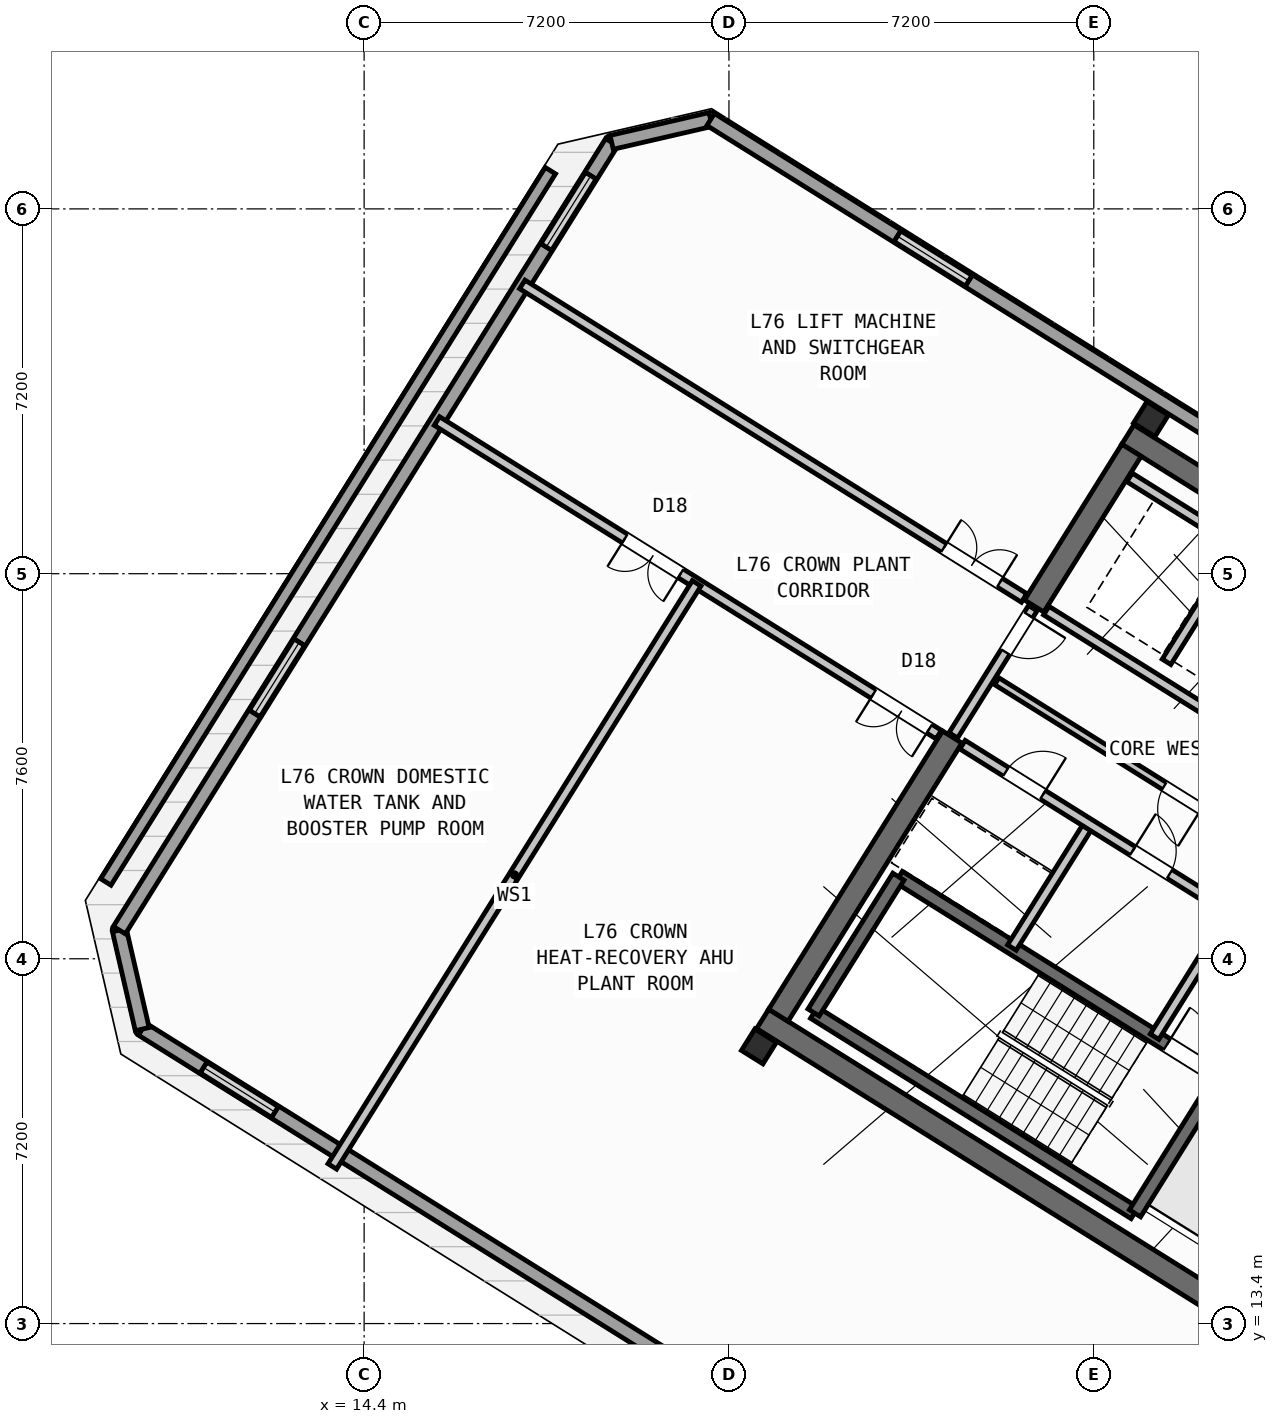
"""IFC4 building model, lengths in metres.
Left out: names, types, materials, properties, quantities, classifications, styles, units other than length and angle.
Written with IfcOpenShell. Run it as: python <this file> out.ifc"""

import sys

from ifc_helpers import new_model, si_unit, direction, frame, frame_2d, origin, origin_2d, place, context, subcontext, project, spatial, rectangle, hollow_rectangle, extrude, source, transform, mapped, element, fill, save


model = new_model("IFC4")
c1 = context("Model", 3, precision=1e-05, world=origin(), true_north=direction((0.0, 1.0)))
c2 = subcontext(c1, "Body", "Model", "MODEL_VIEW")
j1 = project(units=[si_unit("LENGTHUNIT", "METRE"), si_unit("PLANEANGLEUNIT", "RADIAN")], contexts=[c1])
p1 = place(None, origin())
s1 = spatial("IfcSite", under=j1, at=p1, CompositionType="ELEMENT")
p2 = place(p1, origin())
s2 = spatial("IfcBuilding", under=s1, at=p2, CompositionType="ELEMENT")
p3 = place(p2, frame((0.0, 0.0, 298.8)))
s3 = spatial("IfcBuildingStorey", under=s2, at=p3, CompositionType="ELEMENT", Elevation=298.8)
p4 = place(p3, frame((40.531, 24.036, 0.0), z_axis=(0.0, 0.0, 1.0), x_axis=(-0.848048787466, 0.529918157905, 0.0)))
e1 = element("IfcWall", 1, at=p4, inside=s3, PredefinedType="SHEAR", context=c2, shape_type="SweptSolid", body=[
    extrude(rectangle(XDim=13.04, YDim=0.45, at=frame_2d((6.52, 0.0))), origin(), (0.0, 0.0, 1.0), 3.32),
])
p5 = place(p3, frame((33.324, 12.503, 0.0), z_axis=(0.0, 0.0, 1.0), x_axis=(-0.848043529849, 0.529926571782, 0.0)))
e2 = element("IfcWall", 2, at=p5, inside=s3, PredefinedType="SHEAR", context=c2, shape_type="SweptSolid", body=[
    extrude(rectangle(XDim=13.04, YDim=0.45, at=frame_2d((6.52, 0.0))), origin(), (0.0, 0.0, 1.0), 3.32),
])
p6 = place(p3, frame((29.544, 30.636, 0.0), z_axis=(0.0, 0.0, 1.0), x_axis=(-0.529902075036, -0.848058836916, 0.0)))
e3 = element("IfcWall", 3, at=p6, inside=s3, PredefinedType="SHEAR", context=c2, shape_type="SweptSolid", body=[
    extrude(rectangle(XDim=3.625, YDim=0.45, at=frame_2d((1.812, 0.0))), origin(), (0.0, 0.0, 1.0), 3.32),
])
p7 = place(p3, frame((26.007, 24.976, 0.0), z_axis=(0.0, 0.0, 1.0), x_axis=(-0.529931155655, -0.848040665456, 0.0)))
e4 = element("IfcWall", 4, at=p7, inside=s3, PredefinedType="SHEAR", context=c2, shape_type="SweptSolid", body=[
    extrude(rectangle(XDim=6.475, YDim=0.45, at=frame_2d((3.238, 0.0))), origin(), (0.0, 0.0, 1.0), 3.32),
])
m1 = source(origin(), c2, "Body", "SweptSolid", [
    extrude(hollow_rectangle(XDim=0.5, YDim=0.5, WallThickness=0.025, at=origin_2d()), origin(), (0.0, 0.0, 1.0), 3.6),
])
for number, where, z_axis, x_axis in (
    (5, (29.928, 31.251, 0.0), (0.0, 0.0, 1.0), (-0.848, 0.53, 0.0)),
    (6, (22.191, 18.87, 0.0), (0.0, 0.0, 1.0), (-0.848, 0.53, 0.0)),
):
    element("IfcColumn", number, at=place(p3, frame(where, z_axis=z_axis, x_axis=x_axis)), inside=s3, PredefinedType="COLUMN", context=c2, shape_type="MappedRepresentation", body=[
        mapped(m1, transform((0.0, 0.0, 0.0), scale=1.0)),
    ])
p8 = place(p3, frame((9.302, 22.115, 0.0), z_axis=(0.0, 0.0, 1.0), x_axis=(0.529912778381, 0.848052148932, 0.0)))
e7 = element("IfcWall", 7, at=p8, inside=s3, PredefinedType="PARAPET", context=c2, shape_type="SweptSolid", body=[
    extrude(rectangle(XDim=16.556, YDim=0.24, at=frame_2d((8.278, 0.0))), origin(), (0.0, 0.0, 1.0), 1.15),
])
p9 = place(p3, frame((29.512, 7.031, 0.0), z_axis=(0.0, 0.0, 1.0), x_axis=(-0.848049620433, 0.529916824873, 0.0)))
e8 = element("IfcWall", 8, at=p9, inside=s3, PredefinedType="STANDARD", context=c2, shape_type="SweptSolid", body=[
    extrude(rectangle(XDim=22.984, YDim=0.28, at=frame_2d((11.492, 0.0))), origin(), (0.0, 0.0, 1.0), 3.32),
])
p10 = place(p9, frame((8.283, 0.0, 0.85)))
e9 = element("IfcOpeningElement", 9, at=p10, cuts=e8, PredefinedType="OPENING", context=c2, shape_type="SweptSolid", body=[
    extrude(rectangle(XDim=1.7, YDim=1.6, at=frame_2d((0.85, 0.8))), frame((0.0, 0.15, 0.0), z_axis=(0.0, -1.0, 0.0), x_axis=(1.0, 0.0, 0.0)), (0.0, 0.0, 1.0), 0.3),
])
p11 = place(p9, frame((19.875, 0.0, 0.85)))
e10 = element("IfcOpeningElement", 10, at=p11, cuts=e8, PredefinedType="OPENING", context=c2, shape_type="SweptSolid", body=[
    extrude(rectangle(XDim=1.7, YDim=1.6, at=frame_2d((0.85, 0.8))), frame((0.0, 0.15, 0.0), z_axis=(0.0, -1.0, 0.0), x_axis=(1.0, 0.0, 0.0)), (0.0, 0.0, 1.0), 0.3),
])
p12 = place(p3, frame((10.021, 19.211, 0.0), z_axis=(0.0, 0.0, 1.0), x_axis=(-0.224877290768, 0.974387091508, 0.0)))
e11 = element("IfcWall", 11, at=p12, inside=s3, PredefinedType="STANDARD", context=c2, shape_type="SweptSolid", body=[
    extrude(rectangle(XDim=2.005, YDim=0.28, at=frame_2d((1.002, 0.0))), origin(), (0.0, 0.0, 1.0), 3.32),
])
p13 = place(p3, frame((9.57, 21.165, 0.0), z_axis=(0.0, 0.0, 1.0), x_axis=(0.529921134822, 0.84804692728, 0.0)))
e12 = element("IfcWall", 12, at=p13, inside=s3, PredefinedType="STANDARD", context=c2, shape_type="SweptSolid", body=[
    extrude(rectangle(XDim=18.334, YDim=0.28, at=frame_2d((9.167, 0.0))), origin(), (0.0, 0.0, 1.0), 3.32),
])
p14 = place(p13, frame((5.021, 0.0, 0.85)))
e13 = element("IfcOpeningElement", 13, at=p14, cuts=e12, PredefinedType="OPENING", context=c2, shape_type="SweptSolid", body=[
    extrude(rectangle(XDim=1.7, YDim=1.6, at=frame_2d((0.85, 0.8))), frame((0.0, 0.15, 0.0), z_axis=(0.0, -1.0, 0.0), x_axis=(1.0, 0.0, 0.0)), (0.0, 0.0, 1.0), 0.3),
])
p15 = place(p13, frame((15.878, 0.0, 0.85)))
e14 = element("IfcOpeningElement", 14, at=p15, cuts=e12, PredefinedType="OPENING", context=c2, shape_type="SweptSolid", body=[
    extrude(rectangle(XDim=1.7, YDim=1.6, at=frame_2d((0.85, 0.8))), frame((0.0, 0.15, 0.0), z_axis=(0.0, -1.0, 0.0), x_axis=(1.0, 0.0, 0.0)), (0.0, 0.0, 1.0), 0.3),
])
p16 = place(p3, frame((19.285, 36.713, 0.0), z_axis=(0.0, 0.0, 1.0), x_axis=(0.974360407225, 0.224992881738, 0.0)))
e15 = element("IfcWall", 15, at=p16, inside=s3, PredefinedType="STANDARD", context=c2, shape_type="SweptSolid", body=[
    extrude(rectangle(XDim=2.005, YDim=0.28, at=frame_2d((1.003, 0.0))), origin(), (0.0, 0.0, 1.0), 3.32),
])
p17 = place(p3, frame((21.239, 37.164, 0.0), z_axis=(0.0, 0.0, 1.0), x_axis=(0.848046637573, -0.529921598447, 0.0)))
e16 = element("IfcWall", 16, at=p17, inside=s3, PredefinedType="STANDARD", context=c2, shape_type="SweptSolid", body=[
    extrude(rectangle(XDim=22.984, YDim=0.28, at=frame_2d((11.492, 0.0))), origin(), (0.0, 0.0, 1.0), 3.32),
])
p18 = place(p17, frame((4.326, 0.0, 0.85)))
e17 = element("IfcOpeningElement", 17, at=p18, cuts=e16, PredefinedType="OPENING", context=c2, shape_type="SweptSolid", body=[
    extrude(rectangle(XDim=1.7, YDim=1.6, at=frame_2d((0.85, 0.8))), frame((0.0, 0.15, 0.0), z_axis=(0.0, -1.0, 0.0), x_axis=(1.0, 0.0, 0.0)), (0.0, 0.0, 1.0), 0.3),
])
p19 = place(p17, frame((15.968, 0.0, 0.85)))
e18 = element("IfcOpeningElement", 18, at=p19, cuts=e16, PredefinedType="OPENING", context=c2, shape_type="SweptSolid", body=[
    extrude(rectangle(XDim=1.7, YDim=1.6, at=frame_2d((0.85, 0.8))), frame((0.0, 0.15, 0.0), z_axis=(0.0, -1.0, 0.0), x_axis=(1.0, 0.0, 0.0)), (0.0, 0.0, 1.0), 0.3),
])
p20 = place(p3, frame((29.605, 15.581, 0.0), z_axis=(0.0, 0.0, 1.0), x_axis=(-0.848036911448, 0.529937163087, 0.0)))
e19 = element("IfcWall", 19, at=p20, inside=s3, PredefinedType="SHEAR", context=c2, shape_type="SweptSolid", body=[
    extrude(rectangle(XDim=7.46, YDim=0.26, at=frame_2d((3.73, 0.0))), origin(), (0.0, 0.0, 1.0), 3.32),
])
p21 = place(p3, frame((31.28, 18.261, 0.0), z_axis=(0.0, 0.0, 1.0), x_axis=(-0.848051618787, 0.529913626805, 0.0)))
e20 = element("IfcWall", 20, at=p21, inside=s3, PredefinedType="SHEAR", context=c2, shape_type="SweptSolid", body=[
    extrude(rectangle(XDim=7.46, YDim=0.26, at=frame_2d((3.73, 0.0))), origin(), (0.0, 0.0, 1.0), 3.32),
])
p22 = place(p21, frame((0.36, 0.0, 0.0)))
e21 = element("IfcOpeningElement", 21, at=p22, cuts=e20, PredefinedType="OPENING", context=c2, shape_type="SweptSolid", body=[
    extrude(rectangle(XDim=0.86, YDim=2.05, at=frame_2d((0.43, 1.025))), frame((0.0, 0.14, 0.0), z_axis=(0.0, -1.0, 0.0), x_axis=(1.0, 0.0, 0.0)), (0.0, 0.0, 1.0), 0.28),
])
p23 = place(p3, frame((31.288, 18.256, 0.0), z_axis=(0.0, 0.0, 1.0), x_axis=(-0.529943379326, -0.848033026897, 0.0)))
e22 = element("IfcWall", 22, at=p23, inside=s3, PredefinedType="SHEAR", context=c2, shape_type="SweptSolid", body=[
    extrude(rectangle(XDim=3.16, YDim=0.26, at=frame_2d((1.58, 0.0))), origin(), (0.0, 0.0, 1.0), 3.32),
])
p24 = place(p3, frame((24.945, 22.22, 0.0), z_axis=(0.0, 0.0, 1.0), x_axis=(-0.529908658664, -0.84805472316, 0.0)))
e23 = element("IfcWall", 23, at=p24, inside=s3, PredefinedType="SHEAR", context=c2, shape_type="SweptSolid", body=[
    extrude(rectangle(XDim=3.16, YDim=0.26, at=frame_2d((1.58, 0.0))), origin(), (0.0, 0.0, 1.0), 3.32),
])
p25 = place(p3, frame((31.822, 24.998, 0.0), z_axis=(0.0, 0.0, 1.0), x_axis=(-0.848054125777, 0.529909614701, 0.0)))
e24 = element("IfcWall", 24, at=p25, inside=s3, PredefinedType="STANDARD", context=c2, shape_type="SweptSolid", body=[
    extrude(rectangle(XDim=4.668, YDim=0.2, at=frame_2d((2.334, 0.0))), origin(), (0.0, 0.0, 1.0), 3.31),
])
p26 = place(p3, frame((32.108, 22.814, 0.0), z_axis=(0.0, 0.0, 1.0), x_axis=(-0.848047283855, 0.529920564185, 0.0)))
e25 = element("IfcWall", 25, at=p26, inside=s3, PredefinedType="PARTITIONING", context=c2, shape_type="SweptSolid", body=[
    extrude(rectangle(XDim=6.16, YDim=0.16, at=frame_2d((3.08, 0.0))), origin(), (0.0, 0.0, 1.0), 3.31),
])
p27 = place(p26, frame((1.4, 0.0, 0.0)))
e26 = element("IfcOpeningElement", 26, at=p27, cuts=e25, PredefinedType="OPENING", context=c2, shape_type="SweptSolid", body=[
    extrude(rectangle(XDim=0.86, YDim=2.05, at=frame_2d((0.43, 1.025))), frame((0.0, 0.09, 0.0), z_axis=(0.0, -1.0, 0.0), x_axis=(1.0, 0.0, 0.0)), (0.0, 0.0, 1.0), 0.18),
])
p28 = place(p3, frame((31.645, 28.716, 0.0), z_axis=(0.0, 0.0, 1.0), x_axis=(-0.52986693015, -0.848080795876, 0.0)))
e27 = element("IfcWall", 27, at=p28, inside=s3, PredefinedType="STANDARD", context=c2, shape_type="SweptSolid", body=[
    extrude(rectangle(XDim=2.66, YDim=0.2, at=frame_2d((1.33, 0.0))), origin(), (0.0, 0.0, 1.0), 3.31),
])
p29 = place(p3, frame((33.363, 27.69, 0.0), z_axis=(0.0, 0.0, 1.0), x_axis=(-0.84804957148, 0.529916903215, 0.0)))
e28 = element("IfcWall", 28, at=p29, inside=s3, PredefinedType="STANDARD", context=c2, shape_type="SweptSolid", body=[
    extrude(rectangle(XDim=4.548, YDim=0.2, at=frame_2d((2.274, 0.0))), origin(), (0.0, 0.0, 1.0), 3.31),
])
for number, where, z_axis, x_axis in (
    (29, (31.525, 21.504, 0.0), (0.0, 0.0, 1.0), (-0.53, -0.848, 0.0)),
    (30, (28.71, 23.263, 0.0), (0.0, 0.0, 1.0), (-0.53, -0.848, 0.0)),
):
    element("IfcWall", number, at=place(p3, frame(where, z_axis=z_axis, x_axis=x_axis)), inside=s3, PredefinedType="STANDARD", context=c2, shape_type="SweptSolid", body=[
        extrude(rectangle(XDim=2.88, YDim=0.2, at=frame_2d((1.44, 0.0))), origin(), (0.0, 0.0, 1.0), 3.31),
    ])
p30 = place(p3, frame((31.525, 21.504, 0.0), z_axis=(0.0, 0.0, 1.0), x_axis=(-0.848042066329, 0.529928913853, 0.0)))
e31 = element("IfcWall", 31, at=p30, inside=s3, PredefinedType="STANDARD", context=c2, shape_type="SweptSolid", body=[
    extrude(rectangle(XDim=6.268, YDim=0.2, at=frame_2d((3.134, 0.0))), origin(), (0.0, 0.0, 1.0), 3.31),
])
p31 = place(p30, frame((4.4, 0.0, 0.0)))
e32 = element("IfcOpeningElement", 32, at=p31, cuts=e31, PredefinedType="OPENING", context=c2, shape_type="SweptSolid", body=[
    extrude(rectangle(XDim=0.86, YDim=2.05, at=frame_2d((0.43, 1.025))), frame((0.0, 0.11, 0.0), z_axis=(0.0, -1.0, 0.0), x_axis=(1.0, 0.0, 0.0)), (0.0, 0.0, 1.0), 0.22),
])
p32 = place(p30, frame((1.45, 0.0, 0.0)))
e33 = element("IfcOpeningElement", 33, at=p32, cuts=e31, PredefinedType="OPENING", context=c2, shape_type="SweptSolid", body=[
    extrude(rectangle(XDim=0.86, YDim=2.05, at=frame_2d((0.43, 1.025))), frame((0.0, 0.11, 0.0), z_axis=(0.0, -1.0, 0.0), x_axis=(1.0, 0.0, 0.0)), (0.0, 0.0, 1.0), 0.22),
])
p33 = place(p3, frame((27.596, 27.52, 0.0), z_axis=(0.0, 0.0, 1.0), x_axis=(-0.529865479138, -0.848081702443, 0.0)))
e34 = element("IfcWall", 34, at=p33, inside=s3, PredefinedType="STANDARD", context=c2, shape_type="SweptSolid", body=[
    extrude(rectangle(XDim=2.96, YDim=0.2, at=frame_2d((1.48, 0.0))), origin(), (0.0, 0.0, 1.0), 3.31),
])
p34 = place(p33, frame((0.16, 0.0, 0.0)))
e35 = element("IfcOpeningElement", 35, at=p34, cuts=e34, PredefinedType="OPENING", context=c2, shape_type="SweptSolid", body=[
    extrude(rectangle(XDim=0.86, YDim=2.05, at=frame_2d((0.43, 1.025))), frame((0.0, 0.11, 0.0), z_axis=(0.0, -1.0, 0.0), x_axis=(1.0, 0.0, 0.0)), (0.0, 0.0, 1.0), 0.22),
])
p35 = place(p3, frame((25.74, 25.025, 0.0), z_axis=(0.0, 0.0, 1.0), x_axis=(-0.848049978884, 0.529916251227, 0.0)))
e36 = element("IfcWall", 36, at=p35, inside=s3, PredefinedType="STANDARD", context=c2, shape_type="SweptSolid", body=[
    extrude(rectangle(XDim=11.678, YDim=0.2, at=frame_2d((5.839, 0.0))), origin(), (0.0, 0.0, 1.0), 3.31),
])
p36 = place(p35, frame((0.218, 0.0, 0.0)))
e37 = element("IfcOpeningElement", 37, at=p36, cuts=e36, PredefinedType="OPENING", context=c2, shape_type="SweptSolid", body=[
    extrude(rectangle(XDim=1.3, YDim=2.15, at=frame_2d((0.65, 1.075))), frame((0.0, 0.11, 0.0), z_axis=(0.0, -1.0, 0.0), x_axis=(1.0, 0.0, 0.0)), (0.0, 0.0, 1.0), 0.22),
])
p37 = place(p35, frame((6.003, 0.0, 0.0)))
e38 = element("IfcOpeningElement", 38, at=p37, cuts=e36, PredefinedType="OPENING", context=c2, shape_type="SweptSolid", body=[
    extrude(rectangle(XDim=1.3, YDim=2.15, at=frame_2d((0.65, 1.075))), frame((0.0, 0.11, 0.0), z_axis=(0.0, -1.0, 0.0), x_axis=(1.0, 0.0, 0.0)), (0.0, 0.0, 1.0), 0.22),
])
p38 = place(p3, frame((20.963, 28.01, 0.0), z_axis=(0.0, 0.0, 1.0), x_axis=(-0.529926165294, -0.848043783856, 0.0)))
e39 = element("IfcWall", 39, at=p38, inside=s3, PredefinedType="STANDARD", context=c2, shape_type="SweptSolid", body=[
    extrude(rectangle(XDim=13.57, YDim=0.2, at=frame_2d((6.785, 0.0))), origin(), (0.0, 0.0, 1.0), 3.31),
])
p39 = place(p3, frame((27.425, 27.721, 0.0), z_axis=(0.0, 0.0, 1.0), x_axis=(-0.848055849499, 0.529906856089, 0.0)))
e40 = element("IfcWall", 40, at=p39, inside=s3, PredefinedType="STANDARD", context=c2, shape_type="SweptSolid", body=[
    extrude(rectangle(XDim=11.678, YDim=0.2, at=frame_2d((5.839, 0.0))), origin(), (0.0, 0.0, 1.0), 3.31),
])
p40 = place(p39, frame((0.568, 0.0, 0.0)))
e41 = element("IfcOpeningElement", 41, at=p40, cuts=e40, PredefinedType="OPENING", context=c2, shape_type="SweptSolid", body=[
    extrude(rectangle(XDim=1.3, YDim=2.15, at=frame_2d((0.65, 1.075))), frame((0.0, 0.11, 0.0), z_axis=(0.0, -1.0, 0.0), x_axis=(1.0, 0.0, 0.0)), (0.0, 0.0, 1.0), 0.22),
])
m2 = source(origin(), c2, "Body", "SweptSolid", [
    extrude(rectangle(XDim=1.7, YDim=1.6, at=frame_2d((0.85, 0.8))), frame((0.0, 0.03, 0.0), z_axis=(0.0, -1.0, 0.0), x_axis=(1.0, 0.0, 0.0)), (0.0, 0.0, 1.0), 0.06),
])
p41 = place(p11, origin())
e42 = element("IfcWindow", 42, at=p41, inside=s3, PartitioningType="SINGLE_PANEL", PredefinedType="WINDOW", context=c2, shape_type="MappedRepresentation", body=[
    mapped(m2, transform((0.0, 0.0, 0.0), scale=1.0)),
])
fill(e10, e42)
p42 = place(p14, origin())
e43 = element("IfcWindow", 43, at=p42, inside=s3, PartitioningType="SINGLE_PANEL", PredefinedType="WINDOW", context=c2, shape_type="MappedRepresentation", body=[
    mapped(m2, transform((0.0, 0.0, 0.0), scale=1.0)),
])
fill(e13, e43)
p43 = place(p15, origin())
e44 = element("IfcWindow", 44, at=p43, inside=s3, PartitioningType="SINGLE_PANEL", PredefinedType="WINDOW", context=c2, shape_type="MappedRepresentation", body=[
    mapped(m2, transform((0.0, 0.0, 0.0), scale=1.0)),
])
fill(e14, e44)
p44 = place(p18, origin())
e45 = element("IfcWindow", 45, at=p44, inside=s3, PartitioningType="SINGLE_PANEL", PredefinedType="WINDOW", context=c2, shape_type="MappedRepresentation", body=[
    mapped(m2, transform((0.0, 0.0, 0.0), scale=1.0)),
])
fill(e17, e45)
m3 = source(origin(), c2, "Body", "SweptSolid", [
    extrude(rectangle(XDim=0.86, YDim=2.05, at=frame_2d((0.43, 1.025))), frame((0.0, 0.025, 0.0), z_axis=(0.0, -1.0, 0.0), x_axis=(1.0, 0.0, 0.0)), (0.0, 0.0, 1.0), 0.05),
])
p45 = place(p22, frame((0.86, 0.0, 0.0), z_axis=(0.0, 0.0, 1.0), x_axis=(-1.0, 0.0, 0.0)))
e46 = element("IfcDoor", 46, at=p45, inside=s3, OperationType="SINGLE_SWING_LEFT", PredefinedType="DOOR", context=c2, shape_type="MappedRepresentation", body=[
    mapped(m3, transform((0.0, 0.0, 0.0), scale=1.0)),
])
fill(e21, e46)
p46 = place(p27, origin())
e47 = element("IfcDoor", 47, at=p46, inside=s3, OperationType="SINGLE_SWING_LEFT", PredefinedType="DOOR", context=c2, shape_type="MappedRepresentation", body=[
    mapped(m3, transform((0.0, 0.0, 0.0), scale=1.0)),
])
fill(e26, e47)
p47 = place(p31, frame((0.86, 0.0, 0.0), z_axis=(0.0, 0.0, 1.0), x_axis=(-1.0, 0.0, 0.0)))
e48 = element("IfcDoor", 48, at=p47, inside=s3, OperationType="SINGLE_SWING_RIGHT", PredefinedType="DOOR", context=c2, shape_type="MappedRepresentation", body=[
    mapped(m3, transform((0.0, 0.0, 0.0), scale=1.0)),
])
fill(e32, e48)
p48 = place(p32, frame((0.86, 0.0, 0.0), z_axis=(0.0, 0.0, 1.0), x_axis=(-1.0, 0.0, 0.0)))
e49 = element("IfcDoor", 49, at=p48, inside=s3, OperationType="SINGLE_SWING_LEFT", PredefinedType="DOOR", context=c2, shape_type="MappedRepresentation", body=[
    mapped(m3, transform((0.0, 0.0, 0.0), scale=1.0)),
])
fill(e33, e49)
p49 = place(p34, origin())
e50 = element("IfcDoor", 50, at=p49, inside=s3, OperationType="SINGLE_SWING_LEFT", PredefinedType="DOOR", context=c2, shape_type="MappedRepresentation", body=[
    mapped(m3, transform((0.0, 0.0, 0.0), scale=1.0)),
])
fill(e35, e50)
m4 = source(origin(), c2, "Body", "SweptSolid", [
    extrude(rectangle(XDim=1.3, YDim=2.15, at=frame_2d((0.65, 1.075))), frame((0.0, 0.025, 0.0), z_axis=(0.0, -1.0, 0.0), x_axis=(1.0, 0.0, 0.0)), (0.0, 0.0, 1.0), 0.05),
])
p50 = place(p36, origin())
e51 = element("IfcDoor", 51, at=p50, inside=s3, OperationType="DOUBLE_DOOR_SINGLE_SWING", PredefinedType="DOOR", context=c2, shape_type="MappedRepresentation", body=[
    mapped(m4, transform((0.0, 0.0, 0.0), scale=1.0)),
])
fill(e37, e51)
p51 = place(p37, origin())
e52 = element("IfcDoor", 52, at=p51, inside=s3, OperationType="DOUBLE_DOOR_SINGLE_SWING", PredefinedType="DOOR", context=c2, shape_type="MappedRepresentation", body=[
    mapped(m4, transform((0.0, 0.0, 0.0), scale=1.0)),
])
fill(e38, e52)
p52 = place(p40, frame((1.3, 0.0, 0.0), z_axis=(0.0, 0.0, 1.0), x_axis=(-1.0, 0.0, 0.0)))
e53 = element("IfcDoor", 53, at=p52, inside=s3, OperationType="DOUBLE_DOOR_SINGLE_SWING", PredefinedType="DOOR", context=c2, shape_type="MappedRepresentation", body=[
    mapped(m4, transform((0.0, 0.0, 0.0), scale=1.0)),
])
fill(e41, e53)
save(model, sys.argv[1])
